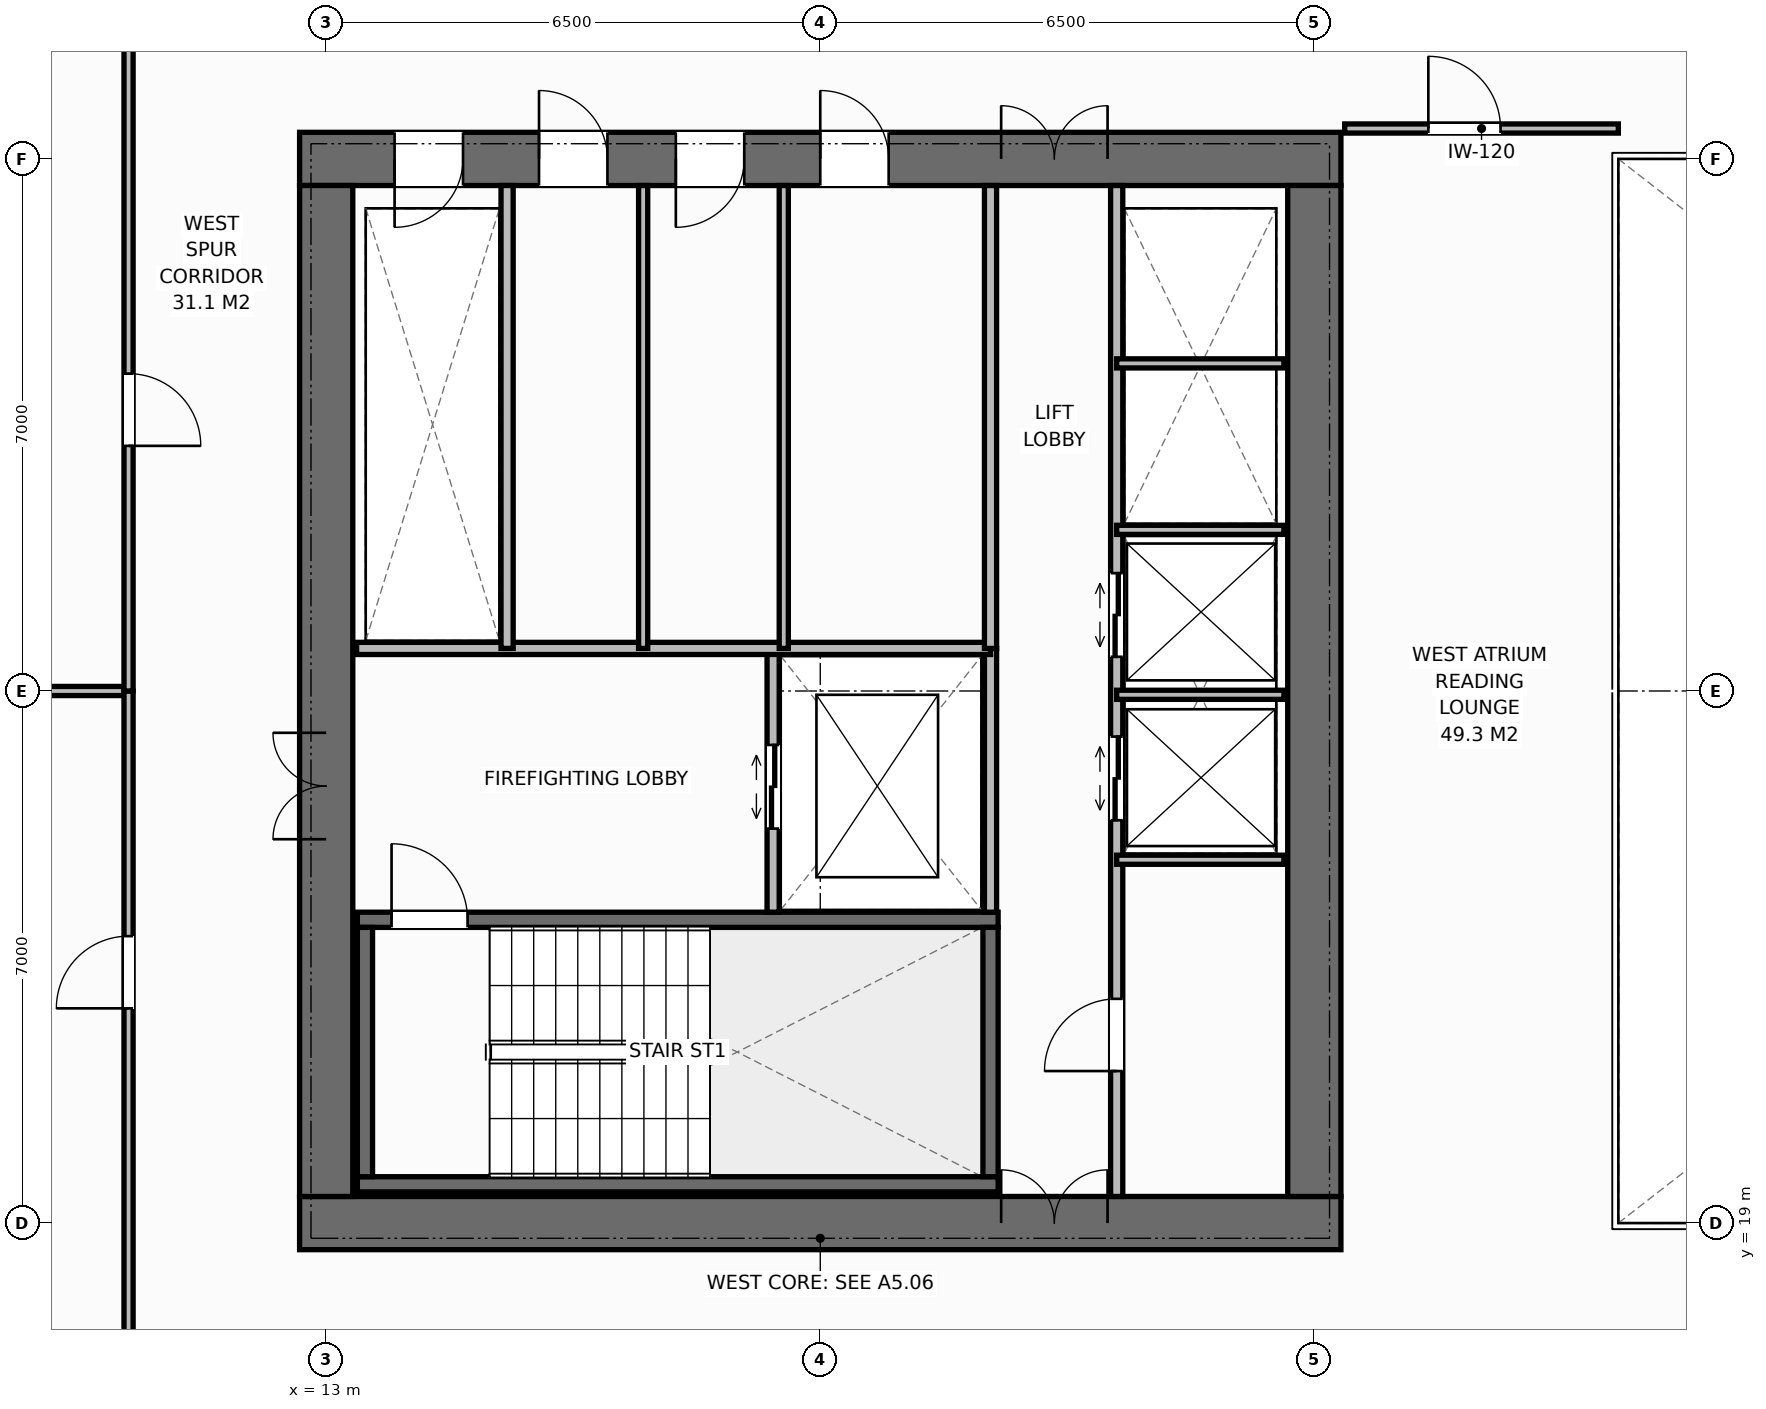
"""IFC4 building model, lengths in metres.
Left out: names, types, materials, properties, quantities, classifications, styles, units other than length and angle.
Written with IfcOpenShell. Run it as: python <this file> out.ifc"""

import sys

from ifc_helpers import new_model, si_unit, direction, frame, frame_2d, origin, place, context, subcontext, project, spatial, rectangle, extrude, element, fill, save


model = new_model("IFC4")
c1 = context("Model", 3, precision=1e-05, world=origin(), true_north=direction((0.0, 1.0)))
c2 = subcontext(c1, "Body", "Model", "MODEL_VIEW")
j1 = project(units=[si_unit("LENGTHUNIT", "METRE"), si_unit("PLANEANGLEUNIT", "RADIAN")], contexts=[c1])
p1 = place(None, origin())
s1 = spatial("IfcSite", under=j1, at=p1, CompositionType="ELEMENT")
p2 = place(p1, origin())
s2 = spatial("IfcBuilding", under=s1, at=p2, CompositionType="ELEMENT")
p3 = place(p2, frame((0.0, 0.0, 108.8)))
s3 = spatial("IfcBuildingStorey", under=s2, at=p3, CompositionType="ELEMENT", Elevation=108.8)
p4 = place(p3, frame((12.65, 19.0, 0.0), z_axis=(0.0, 0.0, 1.0), x_axis=(1.0, 0.0, 0.0)))
e1 = element("IfcWall", 1, at=p4, inside=s3, PredefinedType="SHEAR", context=c2, shape_type="SweptSolid", body=[
    extrude(rectangle(XDim=13.7, YDim=0.7, at=frame_2d((6.85, 0.0))), origin(), (0.0, 0.0, 1.0), 3.8),
])
p5 = place(p4, frame((9.23, 0.0, 0.0)))
e2 = element("IfcOpeningElement", 2, at=p5, cuts=e1, PredefinedType="OPENING", context=c2, shape_type="SweptSolid", body=[
    extrude(rectangle(XDim=1.4, YDim=2.2, at=frame_2d((0.7, 1.1))), frame((0.0, 0.36, 0.0), z_axis=(0.0, -1.0, 0.0), x_axis=(1.0, 0.0, 0.0)), (0.0, 0.0, 1.0), 0.72),
])
p6 = place(p3, frame((12.65, 33.0, 0.0), z_axis=(0.0, 0.0, 1.0), x_axis=(1.0, 0.0, 0.0)))
e3 = element("IfcWall", 3, at=p6, inside=s3, PredefinedType="SHEAR", context=c2, shape_type="SweptSolid", body=[
    extrude(rectangle(XDim=13.7, YDim=0.7, at=frame_2d((6.85, 0.0))), origin(), (0.0, 0.0, 1.0), 3.8),
])
p7 = place(p6, frame((1.25, 0.0, 0.0)))
e4 = element("IfcOpeningElement", 4, at=p7, cuts=e3, PredefinedType="OPENING", context=c2, shape_type="SweptSolid", body=[
    extrude(rectangle(XDim=0.9, YDim=2.15, at=frame_2d((0.45, 1.075))), frame((0.0, 0.36, 0.0), z_axis=(0.0, -1.0, 0.0), x_axis=(1.0, 0.0, 0.0)), (0.0, 0.0, 1.0), 0.72),
])
p8 = place(p6, frame((3.15, 0.0, 0.0)))
e5 = element("IfcOpeningElement", 5, at=p8, cuts=e3, PredefinedType="OPENING", context=c2, shape_type="SweptSolid", body=[
    extrude(rectangle(XDim=0.9, YDim=2.15, at=frame_2d((0.45, 1.075))), frame((0.0, 0.36, 0.0), z_axis=(0.0, -1.0, 0.0), x_axis=(1.0, 0.0, 0.0)), (0.0, 0.0, 1.0), 0.72),
])
p9 = place(p6, frame((4.95, 0.0, 0.0)))
e6 = element("IfcOpeningElement", 6, at=p9, cuts=e3, PredefinedType="OPENING", context=c2, shape_type="SweptSolid", body=[
    extrude(rectangle(XDim=0.9, YDim=2.15, at=frame_2d((0.45, 1.075))), frame((0.0, 0.36, 0.0), z_axis=(0.0, -1.0, 0.0), x_axis=(1.0, 0.0, 0.0)), (0.0, 0.0, 1.0), 0.72),
])
p10 = place(p6, frame((6.85, 0.0, 0.0)))
e7 = element("IfcOpeningElement", 7, at=p10, cuts=e3, PredefinedType="OPENING", context=c2, shape_type="SweptSolid", body=[
    extrude(rectangle(XDim=0.9, YDim=2.15, at=frame_2d((0.45, 1.075))), frame((0.0, 0.36, 0.0), z_axis=(0.0, -1.0, 0.0), x_axis=(1.0, 0.0, 0.0)), (0.0, 0.0, 1.0), 0.72),
])
p11 = place(p6, frame((9.23, 0.0, 0.0)))
e8 = element("IfcOpeningElement", 8, at=p11, cuts=e3, PredefinedType="OPENING", context=c2, shape_type="SweptSolid", body=[
    extrude(rectangle(XDim=1.4, YDim=2.2, at=frame_2d((0.7, 1.1))), frame((0.0, 0.36, 0.0), z_axis=(0.0, -1.0, 0.0), x_axis=(1.0, 0.0, 0.0)), (0.0, 0.0, 1.0), 0.72),
])
p12 = place(p3, frame((13.0, 19.35, 0.0), z_axis=(0.0, 0.0, 1.0), x_axis=(0.0, 1.0, 0.0)))
e9 = element("IfcWall", 9, at=p12, inside=s3, PredefinedType="SHEAR", context=c2, shape_type="SweptSolid", body=[
    extrude(rectangle(XDim=13.3, YDim=0.7, at=frame_2d((6.65, 0.0))), origin(), (0.0, 0.0, 1.0), 3.8),
])
p13 = place(p12, frame((4.7, 0.0, 0.0)))
e10 = element("IfcOpeningElement", 10, at=p13, cuts=e9, PredefinedType="OPENING", context=c2, shape_type="SweptSolid", body=[
    extrude(rectangle(XDim=1.4, YDim=2.2, at=frame_2d((0.7, 1.1))), frame((0.0, 0.36, 0.0), z_axis=(0.0, -1.0, 0.0), x_axis=(1.0, 0.0, 0.0)), (0.0, 0.0, 1.0), 0.72),
])
p14 = place(p3, frame((26.0, 19.35, 0.0), z_axis=(0.0, 0.0, 1.0), x_axis=(0.0, 1.0, 0.0)))
e11 = element("IfcWall", 11, at=p14, inside=s3, PredefinedType="SHEAR", context=c2, shape_type="SweptSolid", body=[
    extrude(rectangle(XDim=13.3, YDim=0.7, at=frame_2d((6.65, 0.0))), origin(), (0.0, 0.0, 1.0), 3.8),
])
p15 = place(p3, frame((13.41, 19.51, 0.0), z_axis=(0.0, 0.0, 1.0), x_axis=(1.0, 0.0, 0.0)))
e12 = element("IfcWall", 12, at=p15, inside=s3, PredefinedType="SHEAR", context=c2, shape_type="SweptSolid", body=[
    extrude(rectangle(XDim=8.43, YDim=0.2, at=frame_2d((4.215, 0.0))), origin(), (0.0, 0.0, 1.0), 3.8),
])
p16 = place(p3, frame((13.41, 22.99, 0.0), z_axis=(0.0, 0.0, 1.0), x_axis=(1.0, 0.0, 0.0)))
e13 = element("IfcWall", 13, at=p16, inside=s3, PredefinedType="SHEAR", context=c2, shape_type="SweptSolid", body=[
    extrude(rectangle(XDim=8.43, YDim=0.2, at=frame_2d((4.215, 0.0))), origin(), (0.0, 0.0, 1.0), 3.8),
])
p17 = place(p16, frame((0.45, 0.0, 0.0)))
e14 = element("IfcOpeningElement", 14, at=p17, cuts=e13, PredefinedType="OPENING", context=c2, shape_type="SweptSolid", body=[
    extrude(rectangle(XDim=1.0, YDim=2.15, at=frame_2d((0.5, 1.075))), frame((0.0, 0.11, 0.0), z_axis=(0.0, -1.0, 0.0), x_axis=(1.0, 0.0, 0.0)), (0.0, 0.0, 1.0), 0.22),
])
for number, where, z_axis, x_axis in (
    (15, (13.51, 19.61, 0.0), (0.0, 0.0, 1.0), (0.0, 1.0, 0.0)),
    (16, (21.74, 19.61, 0.0), (0.0, 0.0, 1.0), (0.0, 1.0, 0.0)),
):
    element("IfcWall", number, at=place(p3, frame(where, z_axis=z_axis, x_axis=x_axis)), inside=s3, PredefinedType="SHEAR", context=c2, shape_type="SweptSolid", body=[
        extrude(rectangle(XDim=3.28, YDim=0.2, at=frame_2d((1.64, 0.0))), origin(), (0.0, 0.0, 1.0), 3.8),
    ])
p18 = place(p3, frame((21.74, 23.09, 0.0), z_axis=(0.0, 0.0, 1.0), x_axis=(0.0, 1.0, 0.0)))
e17 = element("IfcWall", 17, at=p18, inside=s3, PredefinedType="STANDARD", context=c2, shape_type="SweptSolid", body=[
    extrude(rectangle(XDim=3.47, YDim=0.16, at=frame_2d((1.735, 0.0))), origin(), (0.0, 0.0, 1.0), 3.565),
])
p19 = place(p3, frame((18.88, 23.09, 0.0), z_axis=(0.0, 0.0, 1.0), x_axis=(0.0, 1.0, 0.0)))
e18 = element("IfcWall", 18, at=p19, inside=s3, PredefinedType="STANDARD", context=c2, shape_type="SweptSolid", body=[
    extrude(rectangle(XDim=3.47, YDim=0.16, at=frame_2d((1.735, 0.0))), origin(), (0.0, 0.0, 1.0), 3.565),
])
p20 = place(p19, frame((1.1, 0.0, 0.0)))
e19 = element("IfcOpeningElement", 19, at=p20, cuts=e18, PredefinedType="OPENING", context=c2, shape_type="SweptSolid", body=[
    extrude(rectangle(XDim=1.1, YDim=2.2, at=frame_2d((0.55, 1.1))), frame((0.0, 0.09, 0.0), z_axis=(0.0, -1.0, 0.0), x_axis=(1.0, 0.0, 0.0)), (0.0, 0.0, 1.0), 0.18),
])
p21 = place(p3, frame((13.4, 26.56, 0.0), z_axis=(0.0, 0.0, 1.0), x_axis=(1.0, 0.0, 0.0)))
e20 = element("IfcWall", 20, at=p21, inside=s3, PredefinedType="STANDARD", context=c2, shape_type="SweptSolid", body=[
    extrude(rectangle(XDim=8.34, YDim=0.16, at=frame_2d((4.17, 0.0))), origin(), (0.0, 0.0, 1.0), 3.565),
])
p22 = place(p3, frame((15.38, 26.56, 0.0), z_axis=(0.0, 0.0, 1.0), x_axis=(0.0, 1.0, 0.0)))
e21 = element("IfcWall", 21, at=p22, inside=s3, PredefinedType="STANDARD", context=c2, shape_type="SweptSolid", body=[
    extrude(rectangle(XDim=6.09, YDim=0.16, at=frame_2d((3.045, 0.0))), origin(), (0.0, 0.0, 1.0), 3.565),
])
for number, where, z_axis, x_axis in (
    (22, (17.17, 26.56, 0.0), (0.0, 0.0, 1.0), (0.0, 1.0, 0.0)),
    (23, (19.02, 26.56, 0.0), (0.0, 0.0, 1.0), (0.0, 1.0, 0.0)),
):
    element("IfcWall", number, at=place(p3, frame(where, z_axis=z_axis, x_axis=x_axis)), inside=s3, PredefinedType="PARTITIONING", context=c2, shape_type="SweptSolid", body=[
        extrude(rectangle(XDim=6.09, YDim=0.12, at=frame_2d((3.045, 0.0))), origin(), (0.0, 0.0, 1.0), 3.565),
    ])
p23 = place(p3, frame((21.74, 26.56, 0.0), z_axis=(0.0, 0.0, 1.0), x_axis=(0.0, 1.0, 0.0)))
e24 = element("IfcWall", 24, at=p23, inside=s3, PredefinedType="STANDARD", context=c2, shape_type="SweptSolid", body=[
    extrude(rectangle(XDim=6.09, YDim=0.16, at=frame_2d((3.045, 0.0))), origin(), (0.0, 0.0, 1.0), 3.565),
])
p24 = place(p3, frame((23.4, 19.35, 0.0), z_axis=(0.0, 0.0, 1.0), x_axis=(0.0, 1.0, 0.0)))
e25 = element("IfcWall", 25, at=p24, inside=s3, PredefinedType="STANDARD", context=c2, shape_type="SweptSolid", body=[
    extrude(rectangle(XDim=13.3, YDim=0.16, at=frame_2d((6.65, 0.0))), origin(), (0.0, 0.0, 1.0), 3.565),
])
p25 = place(p24, frame((1.65, 0.0, 0.0)))
e26 = element("IfcOpeningElement", 26, at=p25, cuts=e25, PredefinedType="OPENING", context=c2, shape_type="SweptSolid", body=[
    extrude(rectangle(XDim=0.95, YDim=2.15, at=frame_2d((0.475, 1.075))), frame((0.0, 0.09, 0.0), z_axis=(0.0, -1.0, 0.0), x_axis=(1.0, 0.0, 0.0)), (0.0, 0.0, 1.0), 0.18),
])
p26 = place(p24, frame((4.95, 0.0, 0.0)))
e27 = element("IfcOpeningElement", 27, at=p26, cuts=e25, PredefinedType="OPENING", context=c2, shape_type="SweptSolid", body=[
    extrude(rectangle(XDim=1.1, YDim=2.2, at=frame_2d((0.55, 1.1))), frame((0.0, 0.09, 0.0), z_axis=(0.0, -1.0, 0.0), x_axis=(1.0, 0.0, 0.0)), (0.0, 0.0, 1.0), 0.18),
])
p27 = place(p24, frame((7.1, 0.0, 0.0)))
e28 = element("IfcOpeningElement", 28, at=p27, cuts=e25, PredefinedType="OPENING", context=c2, shape_type="SweptSolid", body=[
    extrude(rectangle(XDim=1.1, YDim=2.2, at=frame_2d((0.55, 1.1))), frame((0.0, 0.09, 0.0), z_axis=(0.0, -1.0, 0.0), x_axis=(1.0, 0.0, 0.0)), (0.0, 0.0, 1.0), 0.18),
])
for number, where, z_axis, x_axis in (
    (29, (23.4, 23.78, 0.0), (0.0, 0.0, 1.0), (1.0, 0.0, 0.0)),
    (30, (23.4, 25.95, 0.0), (0.0, 0.0, 1.0), (1.0, 0.0, 0.0)),
    (31, (23.4, 28.12, 0.0), (0.0, 0.0, 1.0), (1.0, 0.0, 0.0)),
    (32, (23.4, 30.31, 0.0), (0.0, 0.0, 1.0), (1.0, 0.0, 0.0)),
):
    element("IfcWall", number, at=place(p3, frame(where, z_axis=z_axis, x_axis=x_axis)), inside=s3, PredefinedType="PARTITIONING", context=c2, shape_type="SweptSolid", body=[
        extrude(rectangle(XDim=2.2, YDim=0.12, at=frame_2d((1.1, 0.0))), origin(), (0.0, 0.0, 1.0), 3.565),
    ])
p28 = place(p3, frame((26.4, 33.4, 0.0), z_axis=(0.0, 0.0, 1.0), x_axis=(1.0, 0.0, 0.0)))
e33 = element("IfcWall", 33, at=p28, inside=s3, PredefinedType="PARTITIONING", context=c2, shape_type="SweptSolid", body=[
    extrude(rectangle(XDim=3.6, YDim=0.12, at=frame_2d((1.8, 0.0))), origin(), (0.0, 0.0, 1.0), 3.565),
])
p29 = place(p28, frame((1.1, 0.0, 0.0)))
e34 = element("IfcOpeningElement", 34, at=p29, cuts=e33, PredefinedType="OPENING", context=c2, shape_type="SweptSolid", body=[
    extrude(rectangle(XDim=0.95, YDim=2.15, at=frame_2d((0.475, 1.075))), frame((0.0, 0.07, 0.0), z_axis=(0.0, -1.0, 0.0), x_axis=(1.0, 0.0, 0.0)), (0.0, 0.0, 1.0), 0.14),
])
p30 = place(p3, frame((1.82, 26.0, 0.0), z_axis=(0.0, 0.0, 1.0), x_axis=(1.0, 0.0, 0.0)))
e35 = element("IfcWall", 35, at=p30, inside=s3, PredefinedType="PARTITIONING", context=c2, shape_type="SweptSolid", body=[
    extrude(rectangle(XDim=8.58, YDim=0.12, at=frame_2d((4.29, 0.0))), origin(), (0.0, 0.0, 1.0), 3.565),
])
p31 = place(p3, frame((10.4, 16.5, 0.0), z_axis=(0.0, 0.0, 1.0), x_axis=(0.0, 1.0, 0.0)))
e36 = element("IfcWall", 36, at=p31, inside=s3, PredefinedType="PARTITIONING", context=c2, shape_type="SweptSolid", body=[
    extrude(rectangle(XDim=9.5, YDim=0.12, at=frame_2d((4.75, 0.0))), origin(), (0.0, 0.0, 1.0), 3.565),
])
p32 = place(p31, frame((5.325, 0.0, 0.0)))
e37 = element("IfcOpeningElement", 37, at=p32, cuts=e36, PredefinedType="OPENING", context=c2, shape_type="SweptSolid", body=[
    extrude(rectangle(XDim=0.95, YDim=2.15, at=frame_2d((0.475, 1.075))), frame((0.0, 0.07, 0.0), z_axis=(0.0, -1.0, 0.0), x_axis=(1.0, 0.0, 0.0)), (0.0, 0.0, 1.0), 0.14),
])
p33 = place(p3, frame((10.4, 26.0, 0.0), z_axis=(0.0, 0.0, 1.0), x_axis=(0.0, 1.0, 0.0)))
e38 = element("IfcWall", 38, at=p33, inside=s3, PredefinedType="PARTITIONING", context=c2, shape_type="SweptSolid", body=[
    extrude(rectangle(XDim=9.5, YDim=0.12, at=frame_2d((4.75, 0.0))), origin(), (0.0, 0.0, 1.0), 3.565),
])
p34 = place(p33, frame((3.225, 0.0, 0.0)))
e39 = element("IfcOpeningElement", 39, at=p34, cuts=e38, PredefinedType="OPENING", context=c2, shape_type="SweptSolid", body=[
    extrude(rectangle(XDim=0.95, YDim=2.15, at=frame_2d((0.475, 1.075))), frame((0.0, 0.07, 0.0), z_axis=(0.0, -1.0, 0.0), x_axis=(1.0, 0.0, 0.0)), (0.0, 0.0, 1.0), 0.14),
])
p35 = place(p17, origin())
e40 = element("IfcDoor", 40, at=p35, inside=s3, OperationType="SINGLE_SWING_LEFT", PredefinedType="DOOR", context=c2, shape_type="SweptSolid", body=[
    extrude(rectangle(XDim=1.0, YDim=2.15, at=frame_2d((0.5, 1.075))), frame((0.0, 0.025, 0.0), z_axis=(0.0, -1.0, 0.0), x_axis=(1.0, 0.0, 0.0)), (0.0, 0.0, 1.0), 0.05),
])
fill(e14, e40)
p36 = place(p13, origin())
e41 = element("IfcDoor", 41, at=p36, inside=s3, OperationType="DOUBLE_DOOR_SINGLE_SWING", PredefinedType="DOOR", context=c2, shape_type="SweptSolid", body=[
    extrude(rectangle(XDim=1.4, YDim=2.2, at=frame_2d((0.7, 1.1))), frame((0.0, 0.025, 0.0), z_axis=(0.0, -1.0, 0.0), x_axis=(1.0, 0.0, 0.0)), (0.0, 0.0, 1.0), 0.05),
])
fill(e10, e41)
p37 = place(p20, origin())
e42 = element("IfcDoor", 42, at=p37, inside=s3, OperationType="DOUBLE_DOOR_SLIDING", PredefinedType="DOOR", context=c2, shape_type="SweptSolid", body=[
    extrude(rectangle(XDim=1.1, YDim=2.2, at=frame_2d((0.55, 1.1))), frame((0.0, 0.025, 0.0), z_axis=(0.0, -1.0, 0.0), x_axis=(1.0, 0.0, 0.0)), (0.0, 0.0, 1.0), 0.05),
])
fill(e19, e42)
p38 = place(p7, origin())
e43 = element("IfcDoor", 43, at=p38, inside=s3, OperationType="SINGLE_SWING_RIGHT", PredefinedType="DOOR", context=c2, shape_type="SweptSolid", body=[
    extrude(rectangle(XDim=0.9, YDim=2.15, at=frame_2d((0.45, 1.075))), frame((0.0, -0.075, 0.0), z_axis=(0.0, -1.0, 0.0), x_axis=(1.0, 0.0, 0.0)), (0.0, 0.0, 1.0), 0.05),
])
fill(e4, e43)
p39 = place(p8, origin())
e44 = element("IfcDoor", 44, at=p39, inside=s3, OperationType="SINGLE_SWING_LEFT", PredefinedType="DOOR", context=c2, shape_type="SweptSolid", body=[
    extrude(rectangle(XDim=0.9, YDim=2.15, at=frame_2d((0.45, 1.075))), frame((0.0, -0.075, 0.0), z_axis=(0.0, -1.0, 0.0), x_axis=(1.0, 0.0, 0.0)), (0.0, 0.0, 1.0), 0.05),
])
fill(e5, e44)
p40 = place(p9, origin())
e45 = element("IfcDoor", 45, at=p40, inside=s3, OperationType="SINGLE_SWING_RIGHT", PredefinedType="DOOR", context=c2, shape_type="SweptSolid", body=[
    extrude(rectangle(XDim=0.9, YDim=2.15, at=frame_2d((0.45, 1.075))), frame((0.0, -0.075, 0.0), z_axis=(0.0, -1.0, 0.0), x_axis=(1.0, 0.0, 0.0)), (0.0, 0.0, 1.0), 0.05),
])
fill(e6, e45)
p41 = place(p10, origin())
e46 = element("IfcDoor", 46, at=p41, inside=s3, OperationType="SINGLE_SWING_LEFT", PredefinedType="DOOR", context=c2, shape_type="SweptSolid", body=[
    extrude(rectangle(XDim=0.9, YDim=2.15, at=frame_2d((0.45, 1.075))), frame((0.0, -0.075, 0.0), z_axis=(0.0, -1.0, 0.0), x_axis=(1.0, 0.0, 0.0)), (0.0, 0.0, 1.0), 0.05),
])
fill(e7, e46)
p42 = place(p5, origin())
e47 = element("IfcDoor", 47, at=p42, inside=s3, OperationType="DOUBLE_DOOR_SINGLE_SWING", PredefinedType="DOOR", context=c2, shape_type="SweptSolid", body=[
    extrude(rectangle(XDim=1.4, YDim=2.2, at=frame_2d((0.7, 1.1))), frame((0.0, 0.125, 0.0), z_axis=(0.0, -1.0, 0.0), x_axis=(1.0, 0.0, 0.0)), (0.0, 0.0, 1.0), 0.05),
])
fill(e2, e47)
p43 = place(p11, origin())
e48 = element("IfcDoor", 48, at=p43, inside=s3, OperationType="DOUBLE_DOOR_SINGLE_SWING", PredefinedType="DOOR", context=c2, shape_type="SweptSolid", body=[
    extrude(rectangle(XDim=1.4, YDim=2.2, at=frame_2d((0.7, 1.1))), frame((0.0, -0.075, 0.0), z_axis=(0.0, -1.0, 0.0), x_axis=(1.0, 0.0, 0.0)), (0.0, 0.0, 1.0), 0.05),
])
fill(e8, e48)
p44 = place(p25, origin())
e49 = element("IfcDoor", 49, at=p44, inside=s3, OperationType="SINGLE_SWING_LEFT", PredefinedType="DOOR", context=c2, shape_type="SweptSolid", body=[
    extrude(rectangle(XDim=0.95, YDim=2.15, at=frame_2d((0.475, 1.075))), frame((0.0, 0.025, 0.0), z_axis=(0.0, -1.0, 0.0), x_axis=(1.0, 0.0, 0.0)), (0.0, 0.0, 1.0), 0.05),
])
fill(e26, e49)
p45 = place(p26, origin())
e50 = element("IfcDoor", 50, at=p45, inside=s3, OperationType="DOUBLE_DOOR_SLIDING", PredefinedType="DOOR", context=c2, shape_type="SweptSolid", body=[
    extrude(rectangle(XDim=1.1, YDim=2.2, at=frame_2d((0.55, 1.1))), frame((0.0, 0.025, 0.0), z_axis=(0.0, -1.0, 0.0), x_axis=(1.0, 0.0, 0.0)), (0.0, 0.0, 1.0), 0.05),
])
fill(e27, e50)
p46 = place(p27, origin())
e51 = element("IfcDoor", 51, at=p46, inside=s3, OperationType="DOUBLE_DOOR_SLIDING", PredefinedType="DOOR", context=c2, shape_type="SweptSolid", body=[
    extrude(rectangle(XDim=1.1, YDim=2.2, at=frame_2d((0.55, 1.1))), frame((0.0, 0.025, 0.0), z_axis=(0.0, -1.0, 0.0), x_axis=(1.0, 0.0, 0.0)), (0.0, 0.0, 1.0), 0.05),
])
fill(e28, e51)
p47 = place(p29, origin())
e52 = element("IfcDoor", 52, at=p47, inside=s3, OperationType="SINGLE_SWING_LEFT", PredefinedType="DOOR", context=c2, shape_type="SweptSolid", body=[
    extrude(rectangle(XDim=0.95, YDim=2.15, at=frame_2d((0.475, 1.075))), frame((0.0, 0.025, 0.0), z_axis=(0.0, -1.0, 0.0), x_axis=(1.0, 0.0, 0.0)), (0.0, 0.0, 1.0), 0.05),
])
fill(e34, e52)
p48 = place(p32, origin())
e53 = element("IfcDoor", 53, at=p48, inside=s3, OperationType="SINGLE_SWING_LEFT", PredefinedType="DOOR", context=c2, shape_type="SweptSolid", body=[
    extrude(rectangle(XDim=0.95, YDim=2.15, at=frame_2d((0.475, 1.075))), frame((0.0, 0.025, 0.0), z_axis=(0.0, -1.0, 0.0), x_axis=(1.0, 0.0, 0.0)), (0.0, 0.0, 1.0), 0.05),
])
fill(e37, e53)
p49 = place(p34, origin())
e54 = element("IfcDoor", 54, at=p49, inside=s3, OperationType="SINGLE_SWING_RIGHT", PredefinedType="DOOR", context=c2, shape_type="SweptSolid", body=[
    extrude(rectangle(XDim=0.95, YDim=2.15, at=frame_2d((0.475, 1.075))), frame((0.0, 0.025, 0.0), z_axis=(0.0, -1.0, 0.0), x_axis=(1.0, 0.0, 0.0)), (0.0, 0.0, 1.0), 0.05),
])
fill(e39, e54)
save(model, sys.argv[1])
